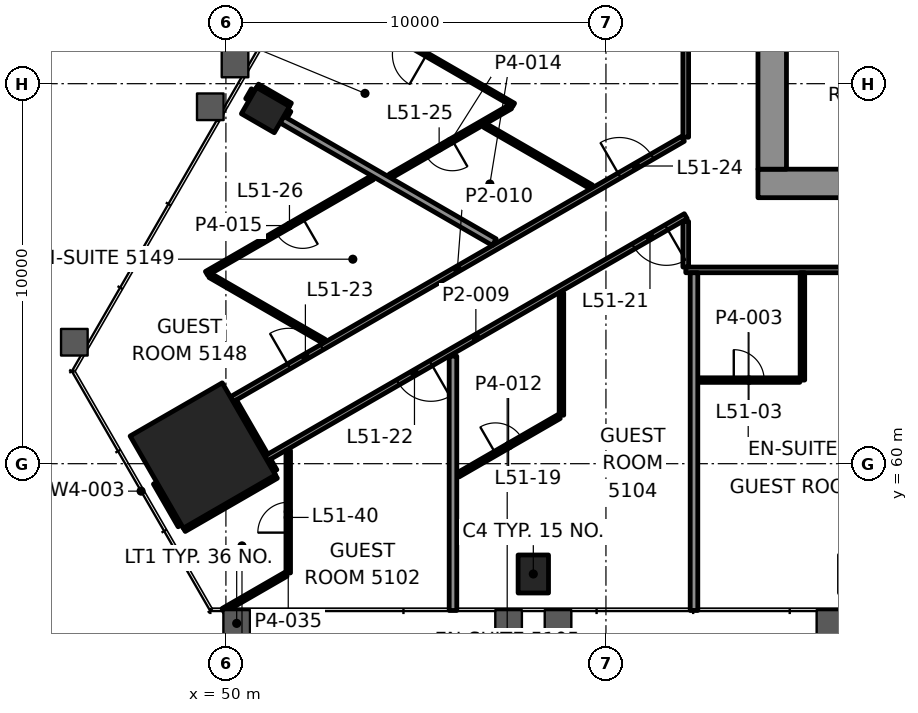
"""IFC4 building model, lengths in metres.
Left out: names, types, materials, properties, quantities, classifications, styles, units other than length and angle.
Written with IfcOpenShell. Run it as: python <this file> out.ifc"""

import sys

from ifc_helpers import new_model, si_unit, direction, frame, frame_2d, origin, origin_2d, place, context, subcontext, project, spatial, rectangle, hollow_rectangle, extrude, element, fill, save


model = new_model("IFC4")
c1 = context("Model", 3, precision=1e-05, world=origin(), true_north=direction((0.0, 1.0)))
c2 = subcontext(c1, "Body", "Model", "MODEL_VIEW")
j1 = project(units=[si_unit("LENGTHUNIT", "METRE"), si_unit("PLANEANGLEUNIT", "RADIAN")], contexts=[c1])
p1 = place(None, origin())
s1 = spatial("IfcSite", under=j1, at=p1, CompositionType="ELEMENT")
p2 = place(p1, origin())
s2 = spatial("IfcBuilding", under=s1, at=p2, CompositionType="ELEMENT")
p3 = place(p2, frame((0.0, 0.0, 218.2)))
s3 = spatial("IfcBuildingStorey", under=s2, at=p3, CompositionType="ELEMENT", Elevation=218.2)
p4 = place(p3, frame((49.392, 60.215, 0.0), z_axis=(0.0, 0.0, 1.0), x_axis=(0.5, -0.866025403784, 0.0)))
e1 = element("IfcColumn", 1, at=p4, inside=s3, PredefinedType="COLUMN", context=c2, shape_type="SweptSolid", body=[
    extrude(rectangle(XDim=2.8, YDim=2.8, at=origin_2d()), origin(), (0.0, 0.0, 1.0), 3.9),
])
for number, where, z_axis, x_axis in (
    (2, (58.089, 57.097, -0.0), (0.0, 0.0, 1.0), (1.0, 0.0, 0.0)),
    (3, (51.04, 69.306, -0.0), (0.0, 0.0, 1.0), (-0.5, -0.866, 0.0)),
):
    element("IfcColumn", number, at=place(p3, frame(where, z_axis=z_axis, x_axis=x_axis)), inside=s3, PredefinedType="COLUMN", context=c2, shape_type="SweptSolid", body=[
        extrude(hollow_rectangle(XDim=0.8, YDim=1.0, WallThickness=0.05, at=origin_2d()), origin(), (0.0, 0.0, 1.0), 3.9),
    ])
p5 = place(p3, frame((64.0, 67.375, 0.0), z_axis=(0.0, 0.0, 1.0), x_axis=(1.0, 0.0, 0.0)))
e4 = element("IfcWall", 4, at=p5, inside=s3, PredefinedType="SHEAR", context=c2, shape_type="SweptSolid", body=[
    extrude(rectangle(XDim=22.0, YDim=0.75, at=frame_2d((11.0, 0.0))), origin(), (0.0, 0.0, 1.0), 3.7),
])
p6 = place(p5, frame((3.15, 0.0, 0.0)))
e5 = element("IfcOpeningElement", 5, at=p6, cuts=e4, PredefinedType="OPENING", context=c2, shape_type="SweptSolid", body=[
    extrude(rectangle(XDim=0.9, YDim=2.1, at=frame_2d((0.45, 1.05))), frame((0.0, 0.385, 0.0), z_axis=(0.0, -1.0, 0.0), x_axis=(1.0, 0.0, 0.0)), (0.0, 0.0, 1.0), 0.77),
])
p7 = place(p3, frame((64.375, 67.75, 0.0), z_axis=(0.0, 0.0, 1.0), x_axis=(0.0, 1.0, 0.0)))
e6 = element("IfcWall", 6, at=p7, inside=s3, PredefinedType="SHEAR", context=c2, shape_type="SweptSolid", body=[
    extrude(rectangle(XDim=14.5, YDim=0.75, at=frame_2d((7.25, 0.0))), origin(), (0.0, 0.0, 1.0), 3.7),
])
p8 = place(p7, frame((4.65, 0.0, 0.0)))
e7 = element("IfcOpeningElement", 7, at=p8, cuts=e6, PredefinedType="OPENING", context=c2, shape_type="SweptSolid", body=[
    extrude(rectangle(XDim=1.8, YDim=2.1, at=frame_2d((0.9, 1.05))), frame((0.0, 0.385, 0.0), z_axis=(0.0, -1.0, 0.0), x_axis=(1.0, 0.0, 0.0)), (0.0, 0.0, 1.0), 0.77),
])
p9 = place(p7, frame((8.5, 0.0, 0.0)))
e8 = element("IfcOpeningElement", 8, at=p9, cuts=e6, PredefinedType="OPENING", context=c2, shape_type="SweptSolid", body=[
    extrude(rectangle(XDim=0.9, YDim=2.1, at=frame_2d((0.45, 1.05))), frame((0.0, 0.385, 0.0), z_axis=(0.0, -1.0, 0.0), x_axis=(1.0, 0.0, 0.0)), (0.0, 0.0, 1.0), 0.77),
])
p10 = place(p7, frame((12.2, 0.0, 0.0)))
e9 = element("IfcOpeningElement", 9, at=p10, cuts=e6, PredefinedType="OPENING", context=c2, shape_type="SweptSolid", body=[
    extrude(rectangle(XDim=0.9, YDim=2.1, at=frame_2d((0.45, 1.05))), frame((0.0, 0.385, 0.0), z_axis=(0.0, -1.0, 0.0), x_axis=(1.0, 0.0, 0.0)), (0.0, 0.0, 1.0), 0.77),
])
p11 = place(p3, frame((62.427, 62.2, 0.0), z_axis=(0.0, 0.0, 1.0), x_axis=(1.0, 0.0, 0.0)))
e10 = element("IfcWall", 10, at=p11, inside=s3, PredefinedType="PARTITIONING", context=c2, shape_type="SweptSolid", body=[
    extrude(rectangle(XDim=2.674, YDim=0.12, at=frame_2d((1.337, 0.0))), origin(), (0.0, 0.0, 1.0), 3.1),
])
p12 = place(p11, frame((0.937, 0.0, 0.0)))
e11 = element("IfcOpeningElement", 11, at=p12, cuts=e10, PredefinedType="OPENING", context=c2, shape_type="SweptSolid", body=[
    extrude(rectangle(XDim=0.8, YDim=2.1, at=frame_2d((0.4, 1.05))), frame((0.0, 0.07, 0.0), z_axis=(0.0, -1.0, 0.0), x_axis=(1.0, 0.0, 0.0)), (0.0, 0.0, 1.0), 0.14),
])
p13 = place(p3, frame((87.899, 65.1, 0.0), z_axis=(0.0, 0.0, 1.0), x_axis=(-1.0, 0.0, 0.0)))
e12 = element("IfcWall", 12, at=p13, inside=s3, PredefinedType="PARTITIONING", context=c2, shape_type="SweptSolid", body=[
    extrude(rectangle(XDim=25.799, YDim=0.15, at=frame_2d((12.899, 0.0))), origin(), (0.0, 0.0, 1.0), 3.1),
])
p14 = place(p13, frame((0.259, 0.0, 0.0)))
e13 = element("IfcOpeningElement", 13, at=p14, cuts=e12, PredefinedType="OPENING", context=c2, shape_type="SweptSolid", body=[
    extrude(rectangle(XDim=1.0, YDim=2.1, at=frame_2d((0.5, 1.05))), frame((0.0, 0.085, 0.0), z_axis=(0.0, -1.0, 0.0), x_axis=(1.0, 0.0, 0.0)), (0.0, 0.0, 1.0), 0.17),
])
p15 = place(p13, frame((4.641, 0.0, 0.0)))
e14 = element("IfcOpeningElement", 14, at=p15, cuts=e12, PredefinedType="OPENING", context=c2, shape_type="SweptSolid", body=[
    extrude(rectangle(XDim=1.0, YDim=2.1, at=frame_2d((0.5, 1.05))), frame((0.0, 0.085, 0.0), z_axis=(0.0, -1.0, 0.0), x_axis=(1.0, 0.0, 0.0)), (0.0, 0.0, 1.0), 0.17),
])
p16 = place(p13, frame((8.868, 0.0, 0.0)))
e15 = element("IfcOpeningElement", 15, at=p16, cuts=e12, PredefinedType="OPENING", context=c2, shape_type="SweptSolid", body=[
    extrude(rectangle(XDim=1.0, YDim=2.1, at=frame_2d((0.5, 1.05))), frame((0.0, 0.085, 0.0), z_axis=(0.0, -1.0, 0.0), x_axis=(1.0, 0.0, 0.0)), (0.0, 0.0, 1.0), 0.17),
])
p17 = place(p13, frame((13.271, 0.0, 0.0)))
e16 = element("IfcOpeningElement", 16, at=p17, cuts=e12, PredefinedType="OPENING", context=c2, shape_type="SweptSolid", body=[
    extrude(rectangle(XDim=1.0, YDim=2.1, at=frame_2d((0.5, 1.05))), frame((0.0, 0.085, 0.0), z_axis=(0.0, -1.0, 0.0), x_axis=(1.0, 0.0, 0.0)), (0.0, 0.0, 1.0), 0.17),
])
p18 = place(p13, frame((19.612, 0.0, 0.0)))
e17 = element("IfcOpeningElement", 17, at=p18, cuts=e12, PredefinedType="OPENING", context=c2, shape_type="SweptSolid", body=[
    extrude(rectangle(XDim=1.0, YDim=2.1, at=frame_2d((0.5, 1.05))), frame((0.0, 0.085, 0.0), z_axis=(0.0, -1.0, 0.0), x_axis=(1.0, 0.0, 0.0)), (0.0, 0.0, 1.0), 0.17),
])
p19 = place(p3, frame((49.929, 56.137, 0.0), z_axis=(0.0, 0.0, 1.0), x_axis=(0.86599573884, 0.500051377671, 0.0)))
e18 = element("IfcWall", 18, at=p19, inside=s3, PredefinedType="PARTITIONING", context=c2, shape_type="SweptSolid", body=[
    extrude(rectangle(XDim=1.906, YDim=0.12, at=frame_2d((0.953, 0.0))), origin(), (0.0, 0.0, 1.0), 3.1),
])
p20 = place(p3, frame((56.109, 59.706, 0.0), z_axis=(0.0, 0.0, 1.0), x_axis=(0.866042588199, 0.499970234539, 0.0)))
e19 = element("IfcWall", 19, at=p20, inside=s3, PredefinedType="PARTITIONING", context=c2, shape_type="SweptSolid", body=[
    extrude(rectangle(XDim=3.071, YDim=0.12, at=frame_2d((1.535, 0.0))), origin(), (0.0, 0.0, 1.0), 3.1),
])
p21 = place(p20, frame((1.135, 0.0, 0.0)))
e20 = element("IfcOpeningElement", 20, at=p21, cuts=e19, PredefinedType="OPENING", context=c2, shape_type="SweptSolid", body=[
    extrude(rectangle(XDim=0.8, YDim=2.1, at=frame_2d((0.4, 1.05))), frame((0.0, 0.07, 0.0), z_axis=(0.0, -1.0, 0.0), x_axis=(1.0, 0.0, 0.0)), (0.0, 0.0, 1.0), 0.14),
])
p22 = place(p3, frame((48.88, 58.303, 0.0), z_axis=(0.0, 0.0, 1.0), x_axis=(0.865985118016, 0.500069770506, 0.0)))
e21 = element("IfcWall", 21, at=p22, inside=s3, PredefinedType="PARTITIONING", context=c2, shape_type="SweptSolid", body=[
    extrude(rectangle(XDim=2.799, YDim=0.2, at=frame_2d((1.399, 0.0))), origin(), (0.0, 0.0, 1.0), 3.1),
])
p23 = place(p3, frame((62.1, 66.513, 0.0), z_axis=(0.0, 0.0, 1.0), x_axis=(-0.866025886419, -0.499999164051, 0.0)))
e22 = element("IfcWall", 22, at=p23, inside=s3, PredefinedType="PARTITIONING", context=c2, shape_type="SweptSolid", body=[
    extrude(rectangle(XDim=12.754, YDim=0.15, at=frame_2d((6.377, 0.0))), origin(), (0.0, 0.0, 1.0), 2.947),
])
p24 = place(p23, frame((0.587, 0.0, 0.0)))
e23 = element("IfcOpeningElement", 23, at=p24, cuts=e22, PredefinedType="OPENING", context=c2, shape_type="SweptSolid", body=[
    extrude(rectangle(XDim=1.0, YDim=2.1, at=frame_2d((0.5, 1.05))), frame((0.0, 0.085, 0.0), z_axis=(0.0, -1.0, 0.0), x_axis=(1.0, 0.0, 0.0)), (0.0, 0.0, 1.0), 0.17),
])
p25 = place(p23, frame((7.742, 0.0, 0.0)))
e24 = element("IfcOpeningElement", 24, at=p25, cuts=e22, PredefinedType="OPENING", context=c2, shape_type="SweptSolid", body=[
    extrude(rectangle(XDim=1.0, YDim=2.1, at=frame_2d((0.5, 1.05))), frame((0.0, 0.085, 0.0), z_axis=(0.0, -1.0, 0.0), x_axis=(1.0, 0.0, 0.0)), (0.0, 0.0, 1.0), 0.17),
])
p26 = place(p3, frame((50.155, 61.695, 0.0), z_axis=(0.0, 0.0, 1.0), x_axis=(0.8660236305, 0.500003071406, 0.0)))
e25 = element("IfcWall", 25, at=p26, inside=s3, PredefinedType="PARTITIONING", context=c2, shape_type="SweptSolid", body=[
    extrude(rectangle(XDim=13.707, YDim=0.15, at=frame_2d((6.853, 0.0))), origin(), (0.0, 0.0, 1.0), 3.1),
])
p27 = place(p26, frame((1.736, 0.0, 0.0)))
e26 = element("IfcOpeningElement", 26, at=p27, cuts=e25, PredefinedType="OPENING", context=c2, shape_type="SweptSolid", body=[
    extrude(rectangle(XDim=1.0, YDim=2.1, at=frame_2d((0.5, 1.05))), frame((0.0, 0.085, 0.0), z_axis=(0.0, -1.0, 0.0), x_axis=(1.0, 0.0, 0.0)), (0.0, 0.0, 1.0), 0.17),
])
p28 = place(p26, frame((11.777, 0.0, 0.0)))
e27 = element("IfcOpeningElement", 27, at=p28, cuts=e25, PredefinedType="OPENING", context=c2, shape_type="SweptSolid", body=[
    extrude(rectangle(XDim=1.0, YDim=2.1, at=frame_2d((0.5, 1.05))), frame((0.0, 0.085, 0.0), z_axis=(0.0, -1.0, 0.0), x_axis=(1.0, 0.0, 0.0)), (0.0, 0.0, 1.0), 0.17),
])
p29 = place(p3, frame((57.486, 69.392, 0.0), z_axis=(0.0, 0.0, 1.0), x_axis=(-0.866029747927, -0.499992475648, 0.0)))
e28 = element("IfcWall", 28, at=p29, inside=s3, PredefinedType="PARTITIONING", context=c2, shape_type="SweptSolid", body=[
    extrude(rectangle(XDim=3.652, YDim=0.12, at=frame_2d((1.826, 0.0))), origin(), (0.0, 0.0, 1.0), 3.1),
])
p30 = place(p29, frame((1.765, 0.0, 0.0)))
e29 = element("IfcOpeningElement", 29, at=p30, cuts=e28, PredefinedType="OPENING", context=c2, shape_type="SweptSolid", body=[
    extrude(rectangle(XDim=0.8, YDim=2.1, at=frame_2d((0.4, 1.05))), frame((0.0, 0.07, 0.0), z_axis=(0.0, -1.0, 0.0), x_axis=(1.0, 0.0, 0.0)), (0.0, 0.0, 1.0), 0.14),
])
p31 = place(p3, frame((53.854, 67.526, 0.0), z_axis=(0.0, 0.0, 1.0), x_axis=(-0.866025012717, -0.500000677347, 0.0)))
e30 = element("IfcWall", 30, at=p31, inside=s3, PredefinedType="PARTITIONING", context=c2, shape_type="SweptSolid", body=[
    extrude(rectangle(XDim=5.039, YDim=0.12, at=frame_2d((2.519, 0.0))), origin(), (0.0, 0.0, 1.0), 3.1),
])
p32 = place(p31, frame((2.119, 0.0, 0.0)))
e31 = element("IfcOpeningElement", 31, at=p32, cuts=e30, PredefinedType="OPENING", context=c2, shape_type="SweptSolid", body=[
    extrude(rectangle(XDim=0.8, YDim=2.1, at=frame_2d((0.4, 1.05))), frame((0.0, 0.07, 0.0), z_axis=(0.0, -1.0, 0.0), x_axis=(1.0, 0.0, 0.0)), (0.0, 0.0, 1.0), 0.14),
])
p33 = place(p3, frame((51.523, 69.143, 0.0), z_axis=(0.0, 0.0, 1.0), x_axis=(0.500359323436, 0.865817848887, 0.0)))
e32 = element("IfcWall", 32, at=p33, inside=s3, PredefinedType="PARTITIONING", context=c2, shape_type="SweptSolid", body=[
    extrude(rectangle(XDim=0.199, YDim=0.2, at=frame_2d((0.1, 0.0))), origin(), (0.0, 0.0, 1.0), 3.1),
])
p34 = place(p3, frame((50.607, 69.556, 0.0), z_axis=(0.0, 0.0, 1.0), x_axis=(0.49965177357, 0.866226359082, 0.0)))
e33 = element("IfcWall", 33, at=p34, inside=s3, PredefinedType="PARTITIONING", context=c2, shape_type="SweptSolid", body=[
    extrude(rectangle(XDim=0.299, YDim=0.2, at=frame_2d((0.149, 0.0))), origin(), (0.0, 0.0, 1.0), 3.1),
])
p35 = place(p3, frame((65.17, 62.2, 0.0), z_axis=(0.0, 0.0, 1.0), x_axis=(0.0, 1.0, 0.0)))
e34 = element("IfcWall", 34, at=p35, inside=s3, PredefinedType="PARTITIONING", context=c2, shape_type="SweptSolid", body=[
    extrude(rectangle(XDim=2.825, YDim=0.12, at=frame_2d((1.413, 0.0))), origin(), (0.0, 0.0, 1.0), 3.1),
])
p36 = place(p3, frame((62.317, 56.137, 0.0), z_axis=(0.0, 0.0, 1.0), x_axis=(0.0, 1.0, 0.0)))
e35 = element("IfcWall", 35, at=p36, inside=s3, PredefinedType="PARTITIONING", context=c2, shape_type="SweptSolid", body=[
    extrude(rectangle(XDim=8.887, YDim=0.2, at=frame_2d((4.444, 0.0))), origin(), (0.0, 0.0, 1.0), 3.022),
])
p37 = place(p3, frame((62.1, 65.176, 0.0), z_axis=(0.0, 0.0, 1.0), x_axis=(0.0, 1.0, 0.0)))
e36 = element("IfcWall", 36, at=p37, inside=s3, PredefinedType="PARTITIONING", context=c2, shape_type="SweptSolid", body=[
    extrude(rectangle(XDim=1.201, YDim=0.15, at=frame_2d((0.6, 0.0))), origin(), (0.0, 0.0, 1.0), 2.947),
])
p38 = place(p3, frame((62.1, 68.591, 0.0), z_axis=(0.0, 0.0, 1.0), x_axis=(0.0, 1.0, 0.0)))
e37 = element("IfcWall", 37, at=p38, inside=s3, PredefinedType="PARTITIONING", context=c2, shape_type="SweptSolid", body=[
    extrude(rectangle(XDim=16.309, YDim=0.15, at=frame_2d((8.154, 0.0))), origin(), (0.0, 0.0, 1.0), 3.1),
])
p39 = place(p38, frame((6.668, 0.0, 0.0)))
e38 = element("IfcOpeningElement", 38, at=p39, cuts=e37, PredefinedType="OPENING", context=c2, shape_type="SweptSolid", body=[
    extrude(rectangle(XDim=1.0, YDim=2.1, at=frame_2d((0.5, 1.05))), frame((0.0, 0.085, 0.0), z_axis=(0.0, -1.0, 0.0), x_axis=(1.0, 0.0, 0.0)), (0.0, 0.0, 1.0), 0.17),
])
p40 = place(p38, frame((13.991, 0.0, 0.0)))
e39 = element("IfcOpeningElement", 39, at=p40, cuts=e37, PredefinedType="OPENING", context=c2, shape_type="SweptSolid", body=[
    extrude(rectangle(XDim=1.0, YDim=2.1, at=frame_2d((0.5, 1.05))), frame((0.0, 0.085, 0.0), z_axis=(0.0, -1.0, 0.0), x_axis=(1.0, 0.0, 0.0)), (0.0, 0.0, 1.0), 0.17),
])
p41 = place(p3, frame((58.829, 61.276, 0.0), z_axis=(0.0, 0.0, 1.0), x_axis=(0.0, 1.0, 0.0)))
e40 = element("IfcWall", 40, at=p41, inside=s3, PredefinedType="PARTITIONING", context=c2, shape_type="SweptSolid", body=[
    extrude(rectangle(XDim=3.222, YDim=0.12, at=frame_2d((1.611, 0.0))), origin(), (0.0, 0.0, 1.0), 2.947),
])
p42 = place(p3, frame((55.975, 56.137, 0.0), z_axis=(0.0, 0.0, 1.0), x_axis=(0.0, 1.0, 0.0)))
e41 = element("IfcWall", 41, at=p42, inside=s3, PredefinedType="PARTITIONING", context=c2, shape_type="SweptSolid", body=[
    extrude(rectangle(XDim=6.692, YDim=0.2, at=frame_2d((3.346, 0.0))), origin(), (0.0, 0.0, 1.0), 3.1),
])
p43 = place(p3, frame((51.64, 57.125, 0.0), z_axis=(0.0, 0.0, 1.0), x_axis=(0.0, 1.0, 0.0)))
e42 = element("IfcWall", 42, at=p43, inside=s3, PredefinedType="PARTITIONING", context=c2, shape_type="SweptSolid", body=[
    extrude(rectangle(XDim=3.222, YDim=0.12, at=frame_2d((1.611, 0.0))), origin(), (0.0, 0.0, 1.0), 3.1),
])
p44 = place(p43, frame((1.061, 0.0, 0.0)))
e43 = element("IfcOpeningElement", 43, at=p44, cuts=e42, PredefinedType="OPENING", context=c2, shape_type="SweptSolid", body=[
    extrude(rectangle(XDim=0.8, YDim=2.1, at=frame_2d((0.4, 1.05))), frame((0.0, 0.07, 0.0), z_axis=(0.0, -1.0, 0.0), x_axis=(1.0, 0.0, 0.0)), (0.0, 0.0, 1.0), 0.14),
])
p45 = place(p3, frame((51.254, 59.79, 0.0), z_axis=(0.0, 0.0, 1.0), x_axis=(-0.499939380126, 0.866060399857, 0.0)))
e44 = element("IfcWall", 44, at=p45, inside=s3, PredefinedType="PARTITIONING", context=c2, shape_type="SweptSolid", body=[
    extrude(rectangle(XDim=0.325, YDim=0.2, at=frame_2d((0.162, 0.0))), origin(), (0.0, 0.0, 1.0), 3.1),
])
p46 = place(p3, frame((48.829, 58.39, 0.0), z_axis=(0.0, 0.0, 1.0), x_axis=(-0.500080332001, 0.865979019114, 0.0)))
e45 = element("IfcWall", 45, at=p46, inside=s3, PredefinedType="PARTITIONING", context=c2, shape_type="SweptSolid", body=[
    extrude(rectangle(XDim=1.299, YDim=0.2, at=frame_2d((0.649, 0.0))), origin(), (0.0, 0.0, 1.0), 3.1),
])
p47 = place(p3, frame((57.571, 69.441, 0.0), z_axis=(0.0, 0.0, 1.0), x_axis=(-0.866026229868, 0.499998569178, 0.0)))
e46 = element("IfcWall", 46, at=p47, inside=s3, PredefinedType="PARTITIONING", context=c2, shape_type="SweptSolid", body=[
    extrude(rectangle(XDim=6.531, YDim=0.1, at=frame_2d((3.266, 0.0))), origin(), (0.0, 0.0, 1.0), 3.022),
])
p48 = place(p47, frame((2.644, 0.0, 0.0)))
e47 = element("IfcOpeningElement", 47, at=p48, cuts=e46, PredefinedType="OPENING", context=c2, shape_type="SweptSolid", body=[
    extrude(rectangle(XDim=0.9, YDim=2.1, at=frame_2d((0.45, 1.05))), frame((0.0, 0.06, 0.0), z_axis=(0.0, -1.0, 0.0), x_axis=(1.0, 0.0, 0.0)), (0.0, 0.0, 1.0), 0.12),
])
p49 = place(p3, frame((59.615, 67.283, 0.0), z_axis=(0.0, 0.0, 1.0), x_axis=(-0.866000447062, 0.500043223821, 0.0)))
e48 = element("IfcWall", 48, at=p49, inside=s3, PredefinedType="PARTITIONING", context=c2, shape_type="SweptSolid", body=[
    extrude(rectangle(XDim=3.228, YDim=0.12, at=frame_2d((1.614, 0.0))), origin(), (0.0, 0.0, 1.0), 3.1),
])
p50 = place(p3, frame((51.673, 69.403, 0.0), z_axis=(0.0, 0.0, 1.0), x_axis=(-0.866039090965, 0.499976292358, 0.0)))
e49 = element("IfcWall", 49, at=p50, inside=s3, PredefinedType="PARTITIONING", context=c2, shape_type="SweptSolid", body=[
    extrude(rectangle(XDim=0.999, YDim=0.2, at=frame_2d((0.5, 0.0))), origin(), (0.0, 0.0, 1.0), 3.022),
])
p51 = place(p3, frame((57.062, 65.83, 0.0), z_axis=(0.0, 0.0, 1.0), x_axis=(-0.866041300655, 0.499972464802, 0.0)))
e50 = element("IfcWall", 50, at=p51, inside=s3, PredefinedType="PARTITIONING", context=c2, shape_type="SweptSolid", body=[
    extrude(rectangle(XDim=6.452, YDim=0.2, at=frame_2d((3.226, 0.0))), origin(), (0.0, 0.0, 1.0), 3.1),
])
p52 = place(p3, frame((52.581, 63.222, 0.0), z_axis=(0.0, 0.0, 1.0), x_axis=(-0.865997524453, 0.50004828531, 0.0)))
e51 = element("IfcWall", 51, at=p52, inside=s3, PredefinedType="PARTITIONING", context=c2, shape_type="SweptSolid", body=[
    extrude(rectangle(XDim=3.459, YDim=0.12, at=frame_2d((1.729, 0.0))), origin(), (0.0, 0.0, 1.0), 3.1),
])
p53 = place(p3, frame((51.017, 60.201, 0.0), z_axis=(0.0, 0.0, 1.0), x_axis=(-0.499991515992, 0.866030301974, 0.0)))
e52 = element("IfcWall", 52, at=p53, inside=s3, PredefinedType="PARTITIONING", context=c2, shape_type="SweptSolid", body=[
    extrude(rectangle(XDim=1.649, YDim=0.2, at=frame_2d((0.825, 0.0))), origin(), (0.0, 0.0, 1.0), 2.947),
])
p54 = place(p12, origin())
e53 = element("IfcDoor", 53, at=p54, inside=s3, OperationType="SINGLE_SWING_RIGHT", PredefinedType="DOOR", context=c2, shape_type="SweptSolid", body=[
    extrude(rectangle(XDim=0.8, YDim=2.1, at=frame_2d((0.4, 1.05))), frame((0.0, 0.025, 0.0), z_axis=(0.0, -1.0, 0.0), x_axis=(1.0, 0.0, 0.0)), (0.0, 0.0, 1.0), 0.05),
])
fill(e11, e53)
p55 = place(p21, origin())
e54 = element("IfcDoor", 54, at=p55, inside=s3, OperationType="SINGLE_SWING_RIGHT", PredefinedType="DOOR", context=c2, shape_type="SweptSolid", body=[
    extrude(rectangle(XDim=0.8, YDim=2.1, at=frame_2d((0.4, 1.05))), frame((0.0, 0.025, 0.0), z_axis=(0.0, -1.0, 0.0), x_axis=(1.0, 0.0, 0.0)), (0.0, 0.0, 1.0), 0.05),
])
fill(e20, e54)
p56 = place(p24, origin())
e55 = element("IfcDoor", 55, at=p56, inside=s3, OperationType="SINGLE_SWING_RIGHT", PredefinedType="DOOR", context=c2, shape_type="SweptSolid", body=[
    extrude(rectangle(XDim=1.0, YDim=2.1, at=frame_2d((0.5, 1.05))), frame((0.0, 0.025, 0.0), z_axis=(0.0, -1.0, 0.0), x_axis=(1.0, 0.0, 0.0)), (0.0, 0.0, 1.0), 0.05),
])
fill(e23, e55)
p57 = place(p25, origin())
e56 = element("IfcDoor", 56, at=p57, inside=s3, OperationType="SINGLE_SWING_RIGHT", PredefinedType="DOOR", context=c2, shape_type="SweptSolid", body=[
    extrude(rectangle(XDim=1.0, YDim=2.1, at=frame_2d((0.5, 1.05))), frame((0.0, 0.025, 0.0), z_axis=(0.0, -1.0, 0.0), x_axis=(1.0, 0.0, 0.0)), (0.0, 0.0, 1.0), 0.05),
])
fill(e24, e56)
p58 = place(p27, origin())
e57 = element("IfcDoor", 57, at=p58, inside=s3, OperationType="SINGLE_SWING_LEFT", PredefinedType="DOOR", context=c2, shape_type="SweptSolid", body=[
    extrude(rectangle(XDim=1.0, YDim=2.1, at=frame_2d((0.5, 1.05))), frame((0.0, 0.025, 0.0), z_axis=(0.0, -1.0, 0.0), x_axis=(1.0, 0.0, 0.0)), (0.0, 0.0, 1.0), 0.05),
])
fill(e26, e57)
p59 = place(p28, origin())
e58 = element("IfcDoor", 58, at=p59, inside=s3, OperationType="SINGLE_SWING_RIGHT", PredefinedType="DOOR", context=c2, shape_type="SweptSolid", body=[
    extrude(rectangle(XDim=1.0, YDim=2.1, at=frame_2d((0.5, 1.05))), frame((0.0, 0.025, 0.0), z_axis=(0.0, -1.0, 0.0), x_axis=(1.0, 0.0, 0.0)), (0.0, 0.0, 1.0), 0.05),
])
fill(e27, e58)
p60 = place(p30, origin())
e59 = element("IfcDoor", 59, at=p60, inside=s3, OperationType="SINGLE_SWING_LEFT", PredefinedType="DOOR", context=c2, shape_type="SweptSolid", body=[
    extrude(rectangle(XDim=0.8, YDim=2.1, at=frame_2d((0.4, 1.05))), frame((0.0, 0.025, 0.0), z_axis=(0.0, -1.0, 0.0), x_axis=(1.0, 0.0, 0.0)), (0.0, 0.0, 1.0), 0.05),
])
fill(e29, e59)
p61 = place(p32, origin())
e60 = element("IfcDoor", 60, at=p61, inside=s3, OperationType="SINGLE_SWING_LEFT", PredefinedType="DOOR", context=c2, shape_type="SweptSolid", body=[
    extrude(rectangle(XDim=0.8, YDim=2.1, at=frame_2d((0.4, 1.05))), frame((0.0, 0.025, 0.0), z_axis=(0.0, -1.0, 0.0), x_axis=(1.0, 0.0, 0.0)), (0.0, 0.0, 1.0), 0.05),
])
fill(e31, e60)
p62 = place(p44, origin())
e61 = element("IfcDoor", 61, at=p62, inside=s3, OperationType="SINGLE_SWING_RIGHT", PredefinedType="DOOR", context=c2, shape_type="SweptSolid", body=[
    extrude(rectangle(XDim=0.8, YDim=2.1, at=frame_2d((0.4, 1.05))), frame((0.0, 0.025, 0.0), z_axis=(0.0, -1.0, 0.0), x_axis=(1.0, 0.0, 0.0)), (0.0, 0.0, 1.0), 0.05),
])
fill(e43, e61)
p63 = place(p48, origin())
e62 = element("IfcDoor", 62, at=p63, inside=s3, OperationType="SINGLE_SWING_LEFT", PredefinedType="DOOR", context=c2, shape_type="SweptSolid", body=[
    extrude(rectangle(XDim=0.9, YDim=2.1, at=frame_2d((0.45, 1.05))), frame((0.0, 0.025, 0.0), z_axis=(0.0, -1.0, 0.0), x_axis=(1.0, 0.0, 0.0)), (0.0, 0.0, 1.0), 0.05),
])
fill(e47, e62)
p64 = place(p3, origin())
p65 = place(p64, frame((52.453, 56.123, 0.15), z_axis=(0.0, 0.0, 1.0), x_axis=(1.0, 0.0, 0.0)))
p66 = place(p65, origin())
e63 = element("IfcWindow", 63, at=p66, inside=s3, PartitioningType="SINGLE_PANEL", PredefinedType="WINDOW", context=c2, shape_type="SweptSolid", body=[
    extrude(rectangle(XDim=2.743, YDim=3.55, at=frame_2d((1.372, 1.775))), frame((0.0, 0.03, 0.0), z_axis=(0.0, -1.0, 0.0), x_axis=(1.0, 0.0, 0.0)), (0.0, 0.0, 1.0), 0.06),
])
save(model, sys.argv[1])
